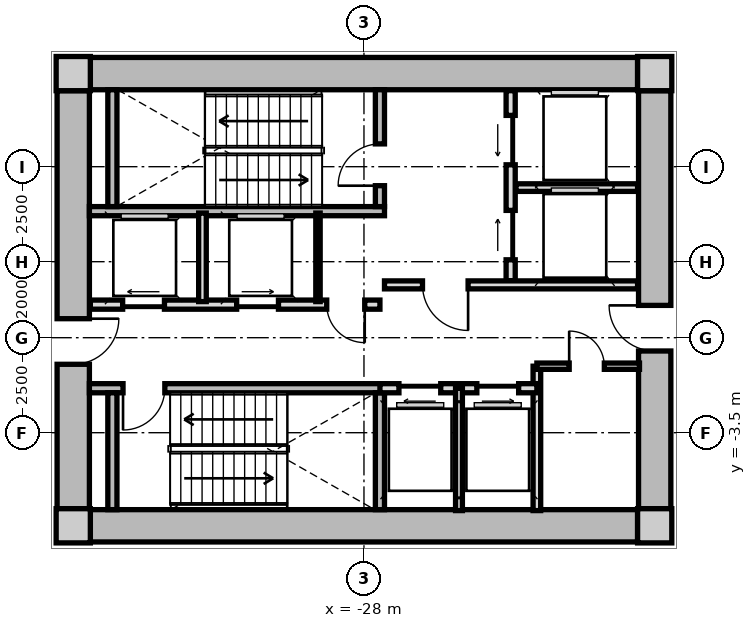
"""IFC4 building model, lengths in metres.
Left out: names, types, materials, properties, quantities, classifications, styles, units other than length and angle.
Written with IfcOpenShell. Run it as: python <this file> out.ifc"""

import sys

from ifc_helpers import new_model, si_unit, direction, frame, frame_2d, origin, origin_2d, place, context, subcontext, project, spatial, rectangle, extrude, source, transform, mapped, element, fill, save


model = new_model("IFC4")
c1 = context("Model", 3, precision=1e-05, world=origin(), true_north=direction((0.0, 1.0)))
c2 = subcontext(c1, "Body", "Model", "MODEL_VIEW")
j1 = project(units=[si_unit("LENGTHUNIT", "METRE"), si_unit("PLANEANGLEUNIT", "RADIAN")], contexts=[c1])
p1 = place(None, origin())
s1 = spatial("IfcSite", under=j1, at=p1, CompositionType="ELEMENT")
p2 = place(p1, origin())
s2 = spatial("IfcBuilding", under=s1, at=p2, CompositionType="ELEMENT")
p3 = place(p2, origin())
s3 = spatial("IfcBuildingStorey", under=s2, at=p3, CompositionType="ELEMENT", Elevation=0.0)
m1 = source(origin(), c2, "Body", "SweptSolid", [
    extrude(rectangle(XDim=0.9, YDim=0.9, at=origin_2d()), origin(), (0.0, 0.0, 1.0), 4.2),
])
for number, where, z_axis, x_axis in (
    (1, (-35.65, -5.95, 0.0), (0.0, 0.0, 1.0), (1.0, 0.0, 0.0)),
    (2, (-20.35, -5.95, 0.0), (0.0, 0.0, 1.0), (1.0, 0.0, 0.0)),
    (3, (-20.35, 5.95, 0.0), (0.0, 0.0, 1.0), (1.0, 0.0, 0.0)),
    (4, (-35.65, 5.95, 0.0), (0.0, 0.0, 1.0), (1.0, 0.0, 0.0)),
):
    element("IfcColumn", number, at=place(p3, frame(where, z_axis=z_axis, x_axis=x_axis)), inside=s3, PredefinedType="COLUMN", context=c2, shape_type="MappedRepresentation", body=[
        mapped(m1, transform((0.0, 0.0, 0.0), x_axis=(1.0, 0.0, 0.0), y_axis=(0.0, 1.0, 0.0), z_axis=(0.0, 0.0, 1.0), scale=1.0)),
    ])
m2 = source(origin(), c2, "Body", "SweptSolid", [
    extrude(rectangle(XDim=14.4, YDim=0.85, at=frame_2d((7.2, 0.0))), origin(), (0.0, 0.0, 1.0), 3.88),
])
for number, where, z_axis, x_axis in (
    (5, (-35.2, 5.95, 0.0), (0.0, 0.0, 1.0), (1.0, 0.0, 0.0)),
    (6, (-20.8, -5.95, 0.0), (0.0, 0.0, 1.0), (-1.0, 0.0, 0.0)),
):
    element("IfcWall", number, at=place(p3, frame(where, z_axis=z_axis, x_axis=x_axis)), inside=s3, PredefinedType="SHEAR", context=c2, shape_type="MappedRepresentation", body=[
        mapped(m2, transform((0.0, 0.0, 0.0), x_axis=(1.0, 0.0, 0.0), y_axis=(0.0, 1.0, 0.0), z_axis=(0.0, 0.0, 1.0), scale=1.0)),
    ])
m3 = source(origin(), c2, "Body", "SweptSolid", [
    extrude(rectangle(XDim=11.0, YDim=0.85, at=frame_2d((5.5, 0.0))), origin(), (0.0, 0.0, 1.0), 3.88),
])
p4 = place(p3, frame((-35.65, -5.5, 0.0), z_axis=(0.0, 0.0, 1.0), x_axis=(0.0, 1.0, 0.0)))
e7 = element("IfcWall", 7, at=p4, inside=s3, PredefinedType="SHEAR", context=c2, shape_type="MappedRepresentation", body=[
    mapped(m3, transform((0.0, 0.0, 0.0), x_axis=(1.0, 0.0, 0.0), y_axis=(0.0, 1.0, 0.0), z_axis=(0.0, 0.0, 1.0), scale=1.0)),
])
p5 = place(p4, frame((3.8, 0.0, 0.0)))
e8 = element("IfcOpeningElement", 8, at=p5, cuts=e7, PredefinedType="OPENING", context=c2, shape_type="SweptSolid", body=[
    extrude(rectangle(XDim=1.2, YDim=2.15, at=frame_2d((0.6, 1.075))), frame((0.0, 0.435, 0.0), z_axis=(0.0, -1.0, 0.0), x_axis=(1.0, 0.0, 0.0)), (0.0, 0.0, 1.0), 0.87),
])
p6 = place(p3, frame((-20.35, 5.5, 0.0), z_axis=(0.0, 0.0, 1.0), x_axis=(0.0, -1.0, 0.0)))
e9 = element("IfcWall", 9, at=p6, inside=s3, PredefinedType="SHEAR", context=c2, shape_type="MappedRepresentation", body=[
    mapped(m3, transform((0.0, 0.0, 0.0), x_axis=(1.0, 0.0, 0.0), y_axis=(0.0, 1.0, 0.0), z_axis=(0.0, 0.0, 1.0), scale=1.0)),
])
p7 = place(p6, frame((5.65, 0.0, 0.0)))
e10 = element("IfcOpeningElement", 10, at=p7, cuts=e9, PredefinedType="OPENING", context=c2, shape_type="SweptSolid", body=[
    extrude(rectangle(XDim=1.2, YDim=2.15, at=frame_2d((0.6, 1.075))), frame((0.0, 0.435, 0.0), z_axis=(0.0, -1.0, 0.0), x_axis=(1.0, 0.0, 0.0)), (0.0, 0.0, 1.0), 0.87),
])
m4 = source(origin(), c2, "Body", "SweptSolid", [
    extrude(rectangle(XDim=7.765, YDim=0.24, at=frame_2d((3.883, 0.0))), origin(), (0.0, 0.0, 1.0), 3.88),
])
p8 = place(p3, frame((-35.225, 2.33, 0.0), z_axis=(0.0, 0.0, 1.0), x_axis=(1.0, 0.0, 0.0)))
e11 = element("IfcWall", 11, at=p8, inside=s3, PredefinedType="PARTITIONING", context=c2, shape_type="MappedRepresentation", body=[
    mapped(m4, transform((0.0, 0.0, 0.0), x_axis=(1.0, 0.0, 0.0), y_axis=(0.0, 1.0, 0.0), z_axis=(0.0, 0.0, 1.0), scale=1.0)),
])
m5 = source(origin(), c2, "Body", "SweptSolid", [
    extrude(rectangle(XDim=3.075, YDim=0.24, at=frame_2d((1.538, 0.0))), origin(), (0.0, 0.0, 1.0), 3.88),
])
p9 = place(p3, frame((-34.62, 2.45, 0.0), z_axis=(0.0, 0.0, 1.0), x_axis=(0.0, 1.0, 0.0)))
e12 = element("IfcWall", 12, at=p9, inside=s3, PredefinedType="PARTITIONING", context=c2, shape_type="MappedRepresentation", body=[
    mapped(m5, transform((0.0, 0.0, 0.0), x_axis=(1.0, 0.0, 0.0), y_axis=(0.0, 1.0, 0.0), z_axis=(0.0, 0.0, 1.0), scale=1.0)),
])
p10 = place(p3, frame((-27.58, 2.45, 0.0), z_axis=(0.0, 0.0, 1.0), x_axis=(0.0, 1.0, 0.0)))
e13 = element("IfcWall", 13, at=p10, inside=s3, PredefinedType="PARTITIONING", context=c2, shape_type="MappedRepresentation", body=[
    mapped(m5, transform((0.0, 0.0, 0.0), x_axis=(1.0, 0.0, 0.0), y_axis=(0.0, 1.0, 0.0), z_axis=(0.0, 0.0, 1.0), scale=1.0)),
])
p11 = place(p10, frame((0.55, 0.0, 0.0)))
e14 = element("IfcOpeningElement", 14, at=p11, cuts=e13, PredefinedType="OPENING", context=c2, shape_type="SweptSolid", body=[
    extrude(rectangle(XDim=1.1, YDim=2.15, at=frame_2d((0.55, 1.075))), frame((0.0, 0.13, 0.0), z_axis=(0.0, -1.0, 0.0), x_axis=(1.0, 0.0, 0.0)), (0.0, 0.0, 1.0), 0.26),
])
p12 = place(p3, frame((-35.225, -2.33, 0.0), z_axis=(0.0, 0.0, 1.0), x_axis=(1.0, 0.0, 0.0)))
e15 = element("IfcWall", 15, at=p12, inside=s3, PredefinedType="PARTITIONING", context=c2, shape_type="MappedRepresentation", body=[
    mapped(m4, transform((0.0, 0.0, 0.0), x_axis=(1.0, 0.0, 0.0), y_axis=(0.0, 1.0, 0.0), z_axis=(0.0, 0.0, 1.0), scale=1.0)),
])
p13 = place(p12, frame((0.885, 0.0, 0.0)))
e16 = element("IfcOpeningElement", 16, at=p13, cuts=e15, PredefinedType="OPENING", context=c2, shape_type="SweptSolid", body=[
    extrude(rectangle(XDim=1.1, YDim=2.15, at=frame_2d((0.55, 1.075))), frame((0.0, 0.13, 0.0), z_axis=(0.0, -1.0, 0.0), x_axis=(1.0, 0.0, 0.0)), (0.0, 0.0, 1.0), 0.26),
])
for number, where, z_axis, x_axis in (
    (17, (-34.62, -5.525, 0.0), (0.0, 0.0, 1.0), (0.0, 1.0, 0.0)),
    (18, (-27.58, -5.525, 0.0), (0.0, 0.0, 1.0), (0.0, 1.0, 0.0)),
):
    element("IfcWall", number, at=place(p3, frame(where, z_axis=z_axis, x_axis=x_axis)), inside=s3, PredefinedType="PARTITIONING", context=c2, shape_type="MappedRepresentation", body=[
        mapped(m5, transform((0.0, 0.0, 0.0), x_axis=(1.0, 0.0, 0.0), y_axis=(0.0, 1.0, 0.0), z_axis=(0.0, 0.0, 1.0), scale=1.0)),
    ])
m6 = source(origin(), c2, "Body", "SweptSolid", [
    extrude(rectangle(XDim=5.0, YDim=0.24, at=frame_2d((2.5, 0.0))), origin(), (0.0, 0.0, 1.0), 3.865),
])
p14 = place(p3, frame((-24.14, 0.5, 0.0), z_axis=(0.0, 0.0, 1.0), x_axis=(0.0, 1.0, 0.0)))
e19 = element("IfcWall", 19, at=p14, inside=s3, PredefinedType="PARTITIONING", context=c2, shape_type="MappedRepresentation", body=[
    mapped(m6, transform((0.0, 0.0, 0.0), x_axis=(1.0, 0.0, 0.0), y_axis=(0.0, 1.0, 0.0), z_axis=(0.0, 0.0, 1.0), scale=1.0)),
])
p15 = place(p14, frame((3.05, 0.0, 0.0)))
e20 = element("IfcOpeningElement", 20, at=p15, cuts=e19, PredefinedType="OPENING", context=c2, shape_type="SweptSolid", body=[
    extrude(rectangle(XDim=1.3, YDim=2.2, at=frame_2d((0.65, 1.1))), frame((0.0, 0.13, 0.0), z_axis=(0.0, -1.0, 0.0), x_axis=(1.0, 0.0, 0.0)), (0.0, 0.0, 1.0), 0.26),
])
p16 = place(p14, frame((0.55, 0.0, 0.0)))
e21 = element("IfcOpeningElement", 21, at=p16, cuts=e19, PredefinedType="OPENING", context=c2, shape_type="SweptSolid", body=[
    extrude(rectangle(XDim=1.3, YDim=2.2, at=frame_2d((0.65, 1.1))), frame((0.0, 0.13, 0.0), z_axis=(0.0, -1.0, 0.0), x_axis=(1.0, 0.0, 0.0)), (0.0, 0.0, 1.0), 0.26),
])
m7 = source(origin(), c2, "Body", "SweptSolid", [
    extrude(rectangle(XDim=3.2, YDim=0.2, at=frame_2d((1.6, 0.0))), origin(), (0.0, 0.0, 1.0), 3.865),
])
p17 = place(p3, frame((-24.0, 2.95, 0.0), z_axis=(0.0, 0.0, 1.0), x_axis=(1.0, 0.0, 0.0)))
e22 = element("IfcWall", 22, at=p17, inside=s3, PredefinedType="PARTITIONING", context=c2, shape_type="MappedRepresentation", body=[
    mapped(m7, transform((0.0, 0.0, 0.0), x_axis=(1.0, 0.0, 0.0), y_axis=(0.0, 1.0, 0.0), z_axis=(0.0, 0.0, 1.0), scale=1.0)),
])
m8 = source(origin(), c2, "Body", "SweptSolid", [
    extrude(rectangle(XDim=6.66, YDim=0.21, at=frame_2d((3.33, 0.0))), origin(), (0.0, 0.0, 1.0), 3.865),
])
p18 = place(p3, frame((-27.46, 0.39, 0.0), z_axis=(0.0, 0.0, 1.0), x_axis=(1.0, 0.0, 0.0)))
e23 = element("IfcWall", 23, at=p18, inside=s3, PredefinedType="PARTITIONING", context=c2, shape_type="MappedRepresentation", body=[
    mapped(m8, transform((0.0, 0.0, 0.0), x_axis=(1.0, 0.0, 0.0), y_axis=(0.0, 1.0, 0.0), z_axis=(0.0, 0.0, 1.0), scale=1.0)),
])
p19 = place(p18, frame((1.0, 0.0, 0.0)))
e24 = element("IfcOpeningElement", 24, at=p19, cuts=e23, PredefinedType="OPENING", context=c2, shape_type="SweptSolid", body=[
    extrude(rectangle(XDim=1.2, YDim=2.15, at=frame_2d((0.6, 1.075))), frame((0.0, 0.115, 0.0), z_axis=(0.0, -1.0, 0.0), x_axis=(1.0, 0.0, 0.0)), (0.0, 0.0, 1.0), 0.23),
])
m9 = source(origin(), c2, "Body", "SweptSolid", [
    extrude(rectangle(XDim=7.62, YDim=0.24, at=frame_2d((3.81, 0.0))), origin(), (0.0, 0.0, 1.0), 3.865),
])
p20 = place(p3, frame((-35.2, -0.13, 0.0), z_axis=(0.0, 0.0, 1.0), x_axis=(1.0, 0.0, 0.0)))
e25 = element("IfcWall", 25, at=p20, inside=s3, PredefinedType="PARTITIONING", context=c2, shape_type="MappedRepresentation", body=[
    mapped(m9, transform((0.0, 0.0, 0.0), x_axis=(1.0, 0.0, 0.0), y_axis=(0.0, 1.0, 0.0), z_axis=(0.0, 0.0, 1.0), scale=1.0)),
])
p21 = place(p20, frame((6.22, 0.0, 0.0)))
e26 = element("IfcOpeningElement", 26, at=p21, cuts=e25, PredefinedType="OPENING", context=c2, shape_type="SweptSolid", body=[
    extrude(rectangle(XDim=1.0, YDim=2.1, at=frame_2d((0.5, 1.05))), frame((0.0, 0.13, 0.0), z_axis=(0.0, -1.0, 0.0), x_axis=(1.0, 0.0, 0.0)), (0.0, 0.0, 1.0), 0.26),
])
p22 = place(p20, frame((0.85, 0.0, 0.0)))
e27 = element("IfcOpeningElement", 27, at=p22, cuts=e25, PredefinedType="OPENING", context=c2, shape_type="SweptSolid", body=[
    extrude(rectangle(XDim=1.1, YDim=2.2, at=frame_2d((0.55, 1.1))), frame((0.0, 0.13, 0.0), z_axis=(0.0, -1.0, 0.0), x_axis=(1.0, 0.0, 0.0)), (0.0, 0.0, 1.0), 0.26),
])
p23 = place(p20, frame((3.85, 0.0, 0.0)))
e28 = element("IfcOpeningElement", 28, at=p23, cuts=e25, PredefinedType="OPENING", context=c2, shape_type="SweptSolid", body=[
    extrude(rectangle(XDim=1.1, YDim=2.2, at=frame_2d((0.55, 1.1))), frame((0.0, 0.13, 0.0), z_axis=(0.0, -1.0, 0.0), x_axis=(1.0, 0.0, 0.0)), (0.0, 0.0, 1.0), 0.26),
])
m10 = source(origin(), c2, "Body", "SweptSolid", [
    extrude(rectangle(XDim=2.33, YDim=0.115, at=frame_2d((1.165, 0.0))), origin(), (0.0, 0.0, 1.0), 3.865),
])
p24 = place(p3, frame((-29.21, -0.05, 0.0), z_axis=(0.0, 0.0, 1.0), x_axis=(0.0, 1.0, 0.0)))
e29 = element("IfcWall", 29, at=p24, inside=s3, PredefinedType="PARTITIONING", context=c2, shape_type="MappedRepresentation", body=[
    mapped(m10, transform((0.0, 0.0, 0.0), x_axis=(1.0, 0.0, 0.0), y_axis=(0.0, 1.0, 0.0), z_axis=(0.0, 0.0, 1.0), scale=1.0)),
])
m11 = source(origin(), c2, "Body", "SweptSolid", [
    extrude(rectangle(XDim=2.33, YDim=0.2, at=frame_2d((1.165, 0.0))), origin(), (0.0, 0.0, 1.0), 3.865),
])
p25 = place(p3, frame((-32.25, -0.05, 0.0), z_axis=(0.0, 0.0, 1.0), x_axis=(0.0, 1.0, 0.0)))
e30 = element("IfcWall", 30, at=p25, inside=s3, PredefinedType="PARTITIONING", context=c2, shape_type="MappedRepresentation", body=[
    mapped(m11, transform((0.0, 0.0, 0.0), x_axis=(1.0, 0.0, 0.0), y_axis=(0.0, 1.0, 0.0), z_axis=(0.0, 0.0, 1.0), scale=1.0)),
])
m12 = source(origin(), c2, "Body", "SweptSolid", [
    extrude(rectangle(XDim=3.8, YDim=0.2, at=frame_2d((1.9, 0.0))), origin(), (0.0, 0.0, 1.0), 3.865),
])
p26 = place(p3, frame((-23.45, -5.55, 0.0), z_axis=(0.0, 0.0, 1.0), x_axis=(0.0, 1.0, 0.0)))
e31 = element("IfcWall", 31, at=p26, inside=s3, PredefinedType="PARTITIONING", context=c2, shape_type="MappedRepresentation", body=[
    mapped(m12, transform((0.0, 0.0, 0.0), x_axis=(1.0, 0.0, 0.0), y_axis=(0.0, 1.0, 0.0), z_axis=(0.0, 0.0, 1.0), scale=1.0)),
])
m13 = source(origin(), c2, "Body", "SweptSolid", [
    extrude(rectangle(XDim=4.13, YDim=0.24, at=frame_2d((2.065, 0.0))), origin(), (0.0, 0.0, 1.0), 3.865),
])
p27 = place(p3, frame((-27.58, -2.33, 0.0), z_axis=(0.0, 0.0, 1.0), x_axis=(1.0, 0.0, 0.0)))
e32 = element("IfcWall", 32, at=p27, inside=s3, PredefinedType="PARTITIONING", context=c2, shape_type="MappedRepresentation", body=[
    mapped(m13, transform((0.0, 0.0, 0.0), x_axis=(1.0, 0.0, 0.0), y_axis=(0.0, 1.0, 0.0), z_axis=(0.0, 0.0, 1.0), scale=1.0)),
])
p28 = place(p27, frame((0.5, 0.0, 0.0)))
e33 = element("IfcOpeningElement", 33, at=p28, cuts=e32, PredefinedType="OPENING", context=c2, shape_type="SweptSolid", body=[
    extrude(rectangle(XDim=1.1, YDim=2.2, at=frame_2d((0.55, 1.1))), frame((0.0, 0.13, 0.0), z_axis=(0.0, -1.0, 0.0), x_axis=(1.0, 0.0, 0.0)), (0.0, 0.0, 1.0), 0.26),
])
p29 = place(p27, frame((2.55, 0.0, 0.0)))
e34 = element("IfcOpeningElement", 34, at=p29, cuts=e32, PredefinedType="OPENING", context=c2, shape_type="SweptSolid", body=[
    extrude(rectangle(XDim=1.1, YDim=2.2, at=frame_2d((0.55, 1.1))), frame((0.0, 0.13, 0.0), z_axis=(0.0, -1.0, 0.0), x_axis=(1.0, 0.0, 0.0)), (0.0, 0.0, 1.0), 0.26),
])
m14 = source(origin(), c2, "Body", "SweptSolid", [
    extrude(rectangle(XDim=3.22, YDim=0.18, at=frame_2d((1.61, 0.0))), origin(), (0.0, 0.0, 1.0), 3.865),
])
p30 = place(p3, frame((-25.5, -5.55, 0.0), z_axis=(0.0, 0.0, 1.0), x_axis=(0.0, 1.0, 0.0)))
e35 = element("IfcWall", 35, at=p30, inside=s3, PredefinedType="PARTITIONING", context=c2, shape_type="MappedRepresentation", body=[
    mapped(m14, transform((0.0, 0.0, 0.0), x_axis=(1.0, 0.0, 0.0), y_axis=(0.0, 1.0, 0.0), z_axis=(0.0, 0.0, 1.0), scale=1.0)),
])
m15 = source(origin(), c2, "Body", "SweptSolid", [
    extrude(rectangle(XDim=2.7, YDim=0.165, at=frame_2d((1.35, 0.0))), origin(), (0.0, 0.0, 1.0), 3.865),
])
p31 = place(p3, frame((-23.45, -1.75, 0.0), z_axis=(0.0, 0.0, 1.0), x_axis=(1.0, 0.0, 0.0)))
e36 = element("IfcWall", 36, at=p31, inside=s3, PredefinedType="PARTITIONING", context=c2, shape_type="MappedRepresentation", body=[
    mapped(m15, transform((0.0, 0.0, 0.0), x_axis=(1.0, 0.0, 0.0), y_axis=(0.0, 1.0, 0.0), z_axis=(0.0, 0.0, 1.0), scale=1.0)),
])
p32 = place(p31, frame((0.85, 0.0, 0.0)))
e37 = element("IfcOpeningElement", 37, at=p32, cuts=e36, PredefinedType="OPENING", context=c2, shape_type="SweptSolid", body=[
    extrude(rectangle(XDim=0.925, YDim=2.1, at=frame_2d((0.462, 1.05))), frame((0.0, 0.093, 0.0), z_axis=(0.0, -1.0, 0.0), x_axis=(1.0, 0.0, 0.0)), (0.0, 0.0, 1.0), 0.185),
])
m16 = source(origin(), c2, "Body", "SweptSolid", [
    extrude(rectangle(XDim=1.1, YDim=2.15, at=frame_2d((0.55, 1.075))), frame((0.0, 0.025, 0.0), z_axis=(0.0, -1.0, 0.0), x_axis=(1.0, 0.0, 0.0)), (0.0, 0.0, 1.0), 0.05),
])
p33 = place(p11, origin())
e38 = element("IfcDoor", 38, at=p33, inside=s3, OperationType="SINGLE_SWING_LEFT", PredefinedType="DOOR", context=c2, shape_type="MappedRepresentation", body=[
    mapped(m16, transform((0.0, 0.0, 0.0), x_axis=(1.0, 0.0, 0.0), y_axis=(0.0, 1.0, 0.0), z_axis=(0.0, 0.0, 1.0), scale=1.0)),
])
fill(e14, e38)
p34 = place(p13, frame((1.1, 0.0, 0.0), z_axis=(0.0, 0.0, 1.0), x_axis=(-1.0, 0.0, 0.0)))
e39 = element("IfcDoor", 39, at=p34, inside=s3, OperationType="SINGLE_SWING_RIGHT", PredefinedType="DOOR", context=c2, shape_type="MappedRepresentation", body=[
    mapped(m16, transform((0.0, 0.0, 0.0), x_axis=(1.0, 0.0, 0.0), y_axis=(0.0, 1.0, 0.0), z_axis=(0.0, 0.0, 1.0), scale=1.0)),
])
fill(e16, e39)
m17 = source(origin(), c2, "Body", "SweptSolid", [
    extrude(rectangle(XDim=1.3, YDim=2.2, at=frame_2d((0.65, 1.1))), frame((0.0, 0.025, 0.0), z_axis=(0.0, -1.0, 0.0), x_axis=(1.0, 0.0, 0.0)), (0.0, 0.0, 1.0), 0.05),
])
p35 = place(p15, origin())
e40 = element("IfcDoor", 40, at=p35, inside=s3, OperationType="SLIDING_TO_LEFT", PredefinedType="DOOR", context=c2, shape_type="MappedRepresentation", body=[
    mapped(m17, transform((0.0, 0.0, 0.0), x_axis=(1.0, 0.0, 0.0), y_axis=(0.0, 1.0, 0.0), z_axis=(0.0, 0.0, 1.0), scale=1.0)),
])
fill(e20, e40)
p36 = place(p16, origin())
e41 = element("IfcDoor", 41, at=p36, inside=s3, OperationType="SLIDING_TO_RIGHT", PredefinedType="DOOR", context=c2, shape_type="MappedRepresentation", body=[
    mapped(m17, transform((0.0, 0.0, 0.0), x_axis=(1.0, 0.0, 0.0), y_axis=(0.0, 1.0, 0.0), z_axis=(0.0, 0.0, 1.0), scale=1.0)),
])
fill(e21, e41)
m18 = source(origin(), c2, "Body", "SweptSolid", [
    extrude(rectangle(XDim=1.2, YDim=2.15, at=frame_2d((0.6, 1.075))), frame((0.0, 0.025, 0.0), z_axis=(0.0, -1.0, 0.0), x_axis=(1.0, 0.0, 0.0)), (0.0, 0.0, 1.0), 0.05),
])
p37 = place(p19, frame((1.2, 0.0, 0.0), z_axis=(0.0, 0.0, 1.0), x_axis=(-1.0, 0.0, 0.0)))
e42 = element("IfcDoor", 42, at=p37, inside=s3, OperationType="SINGLE_SWING_LEFT", PredefinedType="DOOR", context=c2, shape_type="MappedRepresentation", body=[
    mapped(m18, transform((0.0, 0.0, 0.0), x_axis=(1.0, 0.0, 0.0), y_axis=(0.0, 1.0, 0.0), z_axis=(0.0, 0.0, 1.0), scale=1.0)),
])
fill(e24, e42)
p38 = place(p5, frame((1.2, 0.0, 0.0), z_axis=(0.0, 0.0, 1.0), x_axis=(-1.0, 0.0, 0.0)))
e43 = element("IfcDoor", 43, at=p38, inside=s3, OperationType="SINGLE_SWING_LEFT", PredefinedType="DOOR", context=c2, shape_type="MappedRepresentation", body=[
    mapped(m18, transform((0.0, 0.0, 0.0), x_axis=(1.0, 0.0, 0.0), y_axis=(0.0, 1.0, 0.0), z_axis=(0.0, 0.0, 1.0), scale=1.0)),
])
fill(e8, e43)
p39 = place(p7, frame((1.2, 0.0, 0.0), z_axis=(0.0, 0.0, 1.0), x_axis=(-1.0, 0.0, 0.0)))
e44 = element("IfcDoor", 44, at=p39, inside=s3, OperationType="SINGLE_SWING_RIGHT", PredefinedType="DOOR", context=c2, shape_type="MappedRepresentation", body=[
    mapped(m18, transform((0.0, 0.0, 0.0), x_axis=(1.0, 0.0, 0.0), y_axis=(0.0, 1.0, 0.0), z_axis=(0.0, 0.0, 1.0), scale=1.0)),
])
fill(e10, e44)
m19 = source(origin(), c2, "Body", "SweptSolid", [
    extrude(rectangle(XDim=1.0, YDim=2.1, at=frame_2d((0.5, 1.05))), frame((0.0, 0.025, 0.0), z_axis=(0.0, -1.0, 0.0), x_axis=(1.0, 0.0, 0.0)), (0.0, 0.0, 1.0), 0.05),
])
p40 = place(p21, frame((1.0, 0.0, 0.0), z_axis=(0.0, 0.0, 1.0), x_axis=(-1.0, 0.0, 0.0)))
e45 = element("IfcDoor", 45, at=p40, inside=s3, OperationType="SINGLE_SWING_LEFT", PredefinedType="DOOR", context=c2, shape_type="MappedRepresentation", body=[
    mapped(m19, transform((0.0, 0.0, 0.0), x_axis=(1.0, 0.0, 0.0), y_axis=(0.0, 1.0, 0.0), z_axis=(0.0, 0.0, 1.0), scale=1.0)),
])
fill(e26, e45)
m20 = source(origin(), c2, "Body", "SweptSolid", [
    extrude(rectangle(XDim=1.1, YDim=2.2, at=frame_2d((0.55, 1.1))), frame((0.0, 0.025, 0.0), z_axis=(0.0, -1.0, 0.0), x_axis=(1.0, 0.0, 0.0)), (0.0, 0.0, 1.0), 0.05),
])
p41 = place(p22, origin())
e46 = element("IfcDoor", 46, at=p41, inside=s3, OperationType="SLIDING_TO_LEFT", PredefinedType="DOOR", context=c2, shape_type="MappedRepresentation", body=[
    mapped(m20, transform((0.0, 0.0, 0.0), x_axis=(1.0, 0.0, 0.0), y_axis=(0.0, 1.0, 0.0), z_axis=(0.0, 0.0, 1.0), scale=1.0)),
])
fill(e27, e46)
p42 = place(p23, origin())
e47 = element("IfcDoor", 47, at=p42, inside=s3, OperationType="SLIDING_TO_RIGHT", PredefinedType="DOOR", context=c2, shape_type="MappedRepresentation", body=[
    mapped(m20, transform((0.0, 0.0, 0.0), x_axis=(1.0, 0.0, 0.0), y_axis=(0.0, 1.0, 0.0), z_axis=(0.0, 0.0, 1.0), scale=1.0)),
])
fill(e28, e47)
p43 = place(p28, frame((1.1, 0.0, 0.0), z_axis=(0.0, 0.0, 1.0), x_axis=(-1.0, 0.0, 0.0)))
e48 = element("IfcDoor", 48, at=p43, inside=s3, OperationType="SLIDING_TO_LEFT", PredefinedType="DOOR", context=c2, shape_type="MappedRepresentation", body=[
    mapped(m20, transform((0.0, 0.0, 0.0), x_axis=(1.0, 0.0, 0.0), y_axis=(0.0, 1.0, 0.0), z_axis=(0.0, 0.0, 1.0), scale=1.0)),
])
fill(e33, e48)
p44 = place(p29, frame((1.1, 0.0, 0.0), z_axis=(0.0, 0.0, 1.0), x_axis=(-1.0, 0.0, 0.0)))
e49 = element("IfcDoor", 49, at=p44, inside=s3, OperationType="SLIDING_TO_RIGHT", PredefinedType="DOOR", context=c2, shape_type="MappedRepresentation", body=[
    mapped(m20, transform((0.0, 0.0, 0.0), x_axis=(1.0, 0.0, 0.0), y_axis=(0.0, 1.0, 0.0), z_axis=(0.0, 0.0, 1.0), scale=1.0)),
])
fill(e34, e49)
m21 = source(origin(), c2, "Body", "SweptSolid", [
    extrude(rectangle(XDim=0.925, YDim=2.1, at=frame_2d((0.462, 1.05))), frame((0.0, 0.025, 0.0), z_axis=(0.0, -1.0, 0.0), x_axis=(1.0, 0.0, 0.0)), (0.0, 0.0, 1.0), 0.05),
])
p45 = place(p32, origin())
e50 = element("IfcDoor", 50, at=p45, inside=s3, OperationType="SINGLE_SWING_LEFT", PredefinedType="DOOR", context=c2, shape_type="MappedRepresentation", body=[
    mapped(m21, transform((0.0, 0.0, 0.0), x_axis=(1.0, 0.0, 0.0), y_axis=(0.0, 1.0, 0.0), z_axis=(0.0, 0.0, 1.0), scale=1.0)),
])
fill(e37, e50)
save(model, sys.argv[1])
